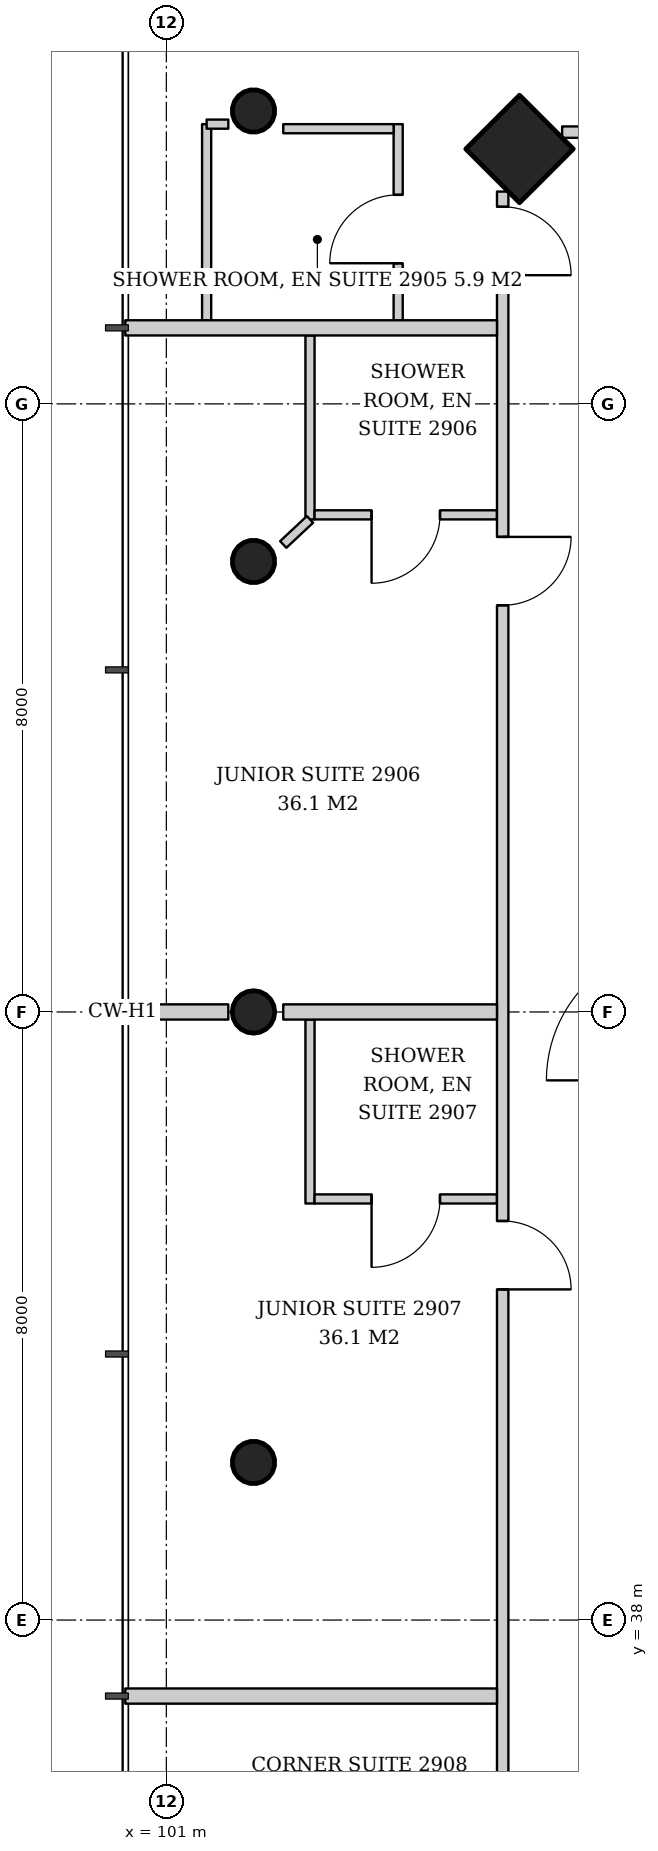
"""IFC4 building model, lengths in metres.
Left out: names, types, materials, properties, quantities, classifications, styles, units other than length and angle.
Written with IfcOpenShell. Run it as: python <this file> out.ifc"""

import sys

from ifc_helpers import new_model, si_unit, direction, frame, frame_2d, origin, origin_2d, place, context, subcontext, project, spatial, rectangle, hollow_circle, extrude, element, fill, save


model = new_model("IFC4")
c1 = context("Model", 3, precision=1e-05, world=origin(), true_north=direction((0.0, 1.0)))
c2 = subcontext(c1, "Body", "Model", "MODEL_VIEW")
j1 = project(units=[si_unit("LENGTHUNIT", "METRE"), si_unit("PLANEANGLEUNIT", "RADIAN")], contexts=[c1])
p1 = place(None, origin())
s1 = spatial("IfcSite", under=j1, at=p1, CompositionType="ELEMENT")
p2 = place(p1, origin())
s2 = spatial("IfcBuilding", under=s1, at=p2, CompositionType="ELEMENT")
p3 = place(p2, frame((0.0, 0.0, 116.0)))
s3 = spatial("IfcBuildingStorey", under=s2, at=p3, CompositionType="ELEMENT", Elevation=116.0)
p4 = place(p3, frame((105.595, 57.405, 0.0), z_axis=(0.043029647111, -0.043029647111, 0.998146732169), x_axis=(0.707106781187, 0.707106781187, 0.0)))
e1 = element("IfcColumn", 1, at=p4, inside=s3, PredefinedType="COLUMN", context=c2, shape_type="SweptSolid", body=[
    extrude(rectangle(XDim=1.0, YDim=1.0, at=origin_2d()), origin(), (0.0, 0.0, 1.0), 3.807),
])
p5 = place(p3, frame((102.095, 57.905, 0.0), z_axis=(0.043029647111, -0.043029647111, 0.998146732169), x_axis=(0.707106781187, 0.707106781187, 0.0)))
e2 = element("IfcColumn", 2, at=p5, inside=s3, PredefinedType="COLUMN", context=c2, shape_type="SweptSolid", body=[
    extrude(hollow_circle(Radius=0.28, WallThickness=0.02, at=origin_2d()), origin(), (0.0, 0.0, 1.0), 3.807),
])
p6 = place(p3, frame((102.095, 51.953, 0.0), z_axis=(0.043059525333, -0.021561848751, 0.998839808957), x_axis=(0.44774654769, 0.894160516368, 0.0)))
e3 = element("IfcColumn", 3, at=p6, inside=s3, PredefinedType="COLUMN", context=c2, shape_type="SweptSolid", body=[
    extrude(hollow_circle(Radius=0.28, WallThickness=0.02, at=origin_2d()), origin(), (0.0, 0.0, 1.0), 3.804),
])
p7 = place(p3, frame((102.095, 46.0, 0.0), z_axis=(0.043069538298, 0.0, 0.999072076915), x_axis=(0.0, 1.0, 0.0)))
e4 = element("IfcColumn", 4, at=p7, inside=s3, PredefinedType="COLUMN", context=c2, shape_type="SweptSolid", body=[
    extrude(hollow_circle(Radius=0.28, WallThickness=0.02, at=origin_2d()), origin(), (0.0, 0.0, 1.0), 3.803),
])
p8 = place(p3, frame((102.095, 40.047, 0.0), z_axis=(0.043059525333, 0.021561848751, 0.998839808957), x_axis=(-0.44774654769, 0.894160516368, 0.0)))
e5 = element("IfcColumn", 5, at=p8, inside=s3, PredefinedType="COLUMN", context=c2, shape_type="SweptSolid", body=[
    extrude(hollow_circle(Radius=0.28, WallThickness=0.02, at=origin_2d()), origin(), (0.0, 0.0, 1.0), 3.804),
])
p9 = place(p3, frame((127.793, 57.575, 0.0), z_axis=(0.0, 0.0, 1.0), x_axis=(-1.0, 0.0, 0.0)))
e6 = element("IfcWall", 6, at=p9, inside=s3, PredefinedType="PARTITIONING", context=c2, shape_type="SweptSolid", body=[
    extrude(rectangle(XDim=21.586, YDim=0.15, at=frame_2d((10.793, 0.0))), origin(), (0.0, 0.0, 1.0), 2.9),
])
p10 = place(p9, frame((0.2, 0.0, 0.0)))
e7 = element("IfcOpeningElement", 7, at=p10, cuts=e6, PredefinedType="OPENING", context=c2, shape_type="SweptSolid", body=[
    extrude(rectangle(XDim=0.9, YDim=2.1, at=frame_2d((0.45, 1.05))), frame((0.0, 0.085, 0.0), z_axis=(0.0, -1.0, 0.0), x_axis=(1.0, 0.0, 0.0)), (0.0, 0.0, 1.0), 0.17),
])
p11 = place(p9, frame((4.543, 0.0, 0.0)))
e8 = element("IfcOpeningElement", 8, at=p11, cuts=e6, PredefinedType="OPENING", context=c2, shape_type="SweptSolid", body=[
    extrude(rectangle(XDim=0.9, YDim=2.1, at=frame_2d((0.45, 1.05))), frame((0.0, 0.085, 0.0), z_axis=(0.0, -1.0, 0.0), x_axis=(1.0, 0.0, 0.0)), (0.0, 0.0, 1.0), 0.17),
])
p12 = place(p9, frame((13.493, 0.0, 0.0)))
e9 = element("IfcOpeningElement", 9, at=p12, cuts=e6, PredefinedType="OPENING", context=c2, shape_type="SweptSolid", body=[
    extrude(rectangle(XDim=1.0, YDim=2.1, at=frame_2d((0.5, 1.05))), frame((0.0, 0.085, 0.0), z_axis=(0.0, -1.0, 0.0), x_axis=(1.0, 0.0, 0.0)), (0.0, 0.0, 1.0), 0.17),
])
p13 = place(p3, frame((104.05, 55.1, 0.0), z_axis=(0.0, 0.0, 1.0), x_axis=(0.0, 1.0, 0.0)))
e10 = element("IfcWall", 10, at=p13, inside=s3, PredefinedType="PARTITIONING", context=c2, shape_type="SweptSolid", body=[
    extrude(rectangle(XDim=2.58, YDim=0.12, at=frame_2d((1.29, 0.0))), origin(), (0.0, 0.0, 1.0), 2.9),
])
p14 = place(p13, frame((0.75, 0.0, 0.0)))
e11 = element("IfcOpeningElement", 11, at=p14, cuts=e10, PredefinedType="OPENING", context=c2, shape_type="SweptSolid", body=[
    extrude(rectangle(XDim=0.9, YDim=2.1, at=frame_2d((0.45, 1.05))), frame((0.0, 0.07, 0.0), z_axis=(0.0, -1.0, 0.0), x_axis=(1.0, 0.0, 0.0)), (0.0, 0.0, 1.0), 0.14),
])
p15 = place(p3, frame((101.53, 55.1, 0.0), z_axis=(0.0, 0.0, 1.0), x_axis=(0.0, 1.0, 0.0)))
e12 = element("IfcWall", 12, at=p15, inside=s3, PredefinedType="PARTITIONING", context=c2, shape_type="SweptSolid", body=[
    extrude(rectangle(XDim=2.58, YDim=0.12, at=frame_2d((1.29, 0.0))), origin(), (0.0, 0.0, 1.0), 3.6),
])
p16 = place(p3, frame((103.99, 57.62, 0.0), z_axis=(0.0, 0.0, 1.0), x_axis=(-1.0, 0.0, 0.0)))
e13 = element("IfcWall", 13, at=p16, inside=s3, PredefinedType="PARTITIONING", context=c2, shape_type="SweptSolid", body=[
    extrude(rectangle(XDim=1.452, YDim=0.12, at=frame_2d((0.726, 0.0))), origin(), (0.0, 0.0, 1.0), 3.2),
])
p17 = place(p3, frame((102.89, 54.9, 0.0), z_axis=(0.0, 0.0, 1.0), x_axis=(0.0, -1.0, 0.0)))
e14 = element("IfcWall", 14, at=p17, inside=s3, PredefinedType="PARTITIONING", context=c2, shape_type="SweptSolid", body=[
    extrude(rectangle(XDim=2.42, YDim=0.12, at=frame_2d((1.21, 0.0))), origin(), (0.0, 0.0, 1.0), 3.6),
])
p18 = place(p3, frame((105.35, 52.54, 0.0), z_axis=(0.0, 0.0, 1.0), x_axis=(-1.0, 0.0, 0.0)))
e15 = element("IfcWall", 15, at=p18, inside=s3, PredefinedType="PARTITIONING", context=c2, shape_type="SweptSolid", body=[
    extrude(rectangle(XDim=2.4, YDim=0.12, at=frame_2d((1.2, 0.0))), origin(), (0.0, 0.0, 1.0), 3.6),
])
p19 = place(p18, frame((0.75, 0.0, 0.0)))
e16 = element("IfcOpeningElement", 16, at=p19, cuts=e15, PredefinedType="OPENING", context=c2, shape_type="SweptSolid", body=[
    extrude(rectangle(XDim=0.9, YDim=2.1, at=frame_2d((0.45, 1.05))), frame((0.0, 0.07, 0.0), z_axis=(0.0, -1.0, 0.0), x_axis=(1.0, 0.0, 0.0)), (0.0, 0.0, 1.0), 0.14),
])
p20 = place(p3, frame((102.89, 45.9, 0.0), z_axis=(0.0, 0.0, 1.0), x_axis=(0.0, -1.0, 0.0)))
e17 = element("IfcWall", 17, at=p20, inside=s3, PredefinedType="PARTITIONING", context=c2, shape_type="SweptSolid", body=[
    extrude(rectangle(XDim=2.42, YDim=0.12, at=frame_2d((1.21, 0.0))), origin(), (0.0, 0.0, 1.0), 3.6),
])
p21 = place(p3, frame((105.35, 43.54, 0.0), z_axis=(0.0, 0.0, 1.0), x_axis=(-1.0, 0.0, 0.0)))
e18 = element("IfcWall", 18, at=p21, inside=s3, PredefinedType="PARTITIONING", context=c2, shape_type="SweptSolid", body=[
    extrude(rectangle(XDim=2.4, YDim=0.12, at=frame_2d((1.2, 0.0))), origin(), (0.0, 0.0, 1.0), 3.6),
])
p22 = place(p21, frame((0.75, 0.0, 0.0)))
e19 = element("IfcOpeningElement", 19, at=p22, cuts=e18, PredefinedType="OPENING", context=c2, shape_type="SweptSolid", body=[
    extrude(rectangle(XDim=0.9, YDim=2.1, at=frame_2d((0.45, 1.05))), frame((0.0, 0.07, 0.0), z_axis=(0.0, -1.0, 0.0), x_axis=(1.0, 0.0, 0.0)), (0.0, 0.0, 1.0), 0.14),
])
p23 = place(p3, frame((105.425, 56.793, 0.0), z_axis=(0.0, 0.0, 1.0), x_axis=(0.0, -1.0, 0.0)))
e20 = element("IfcWall", 20, at=p23, inside=s3, PredefinedType="PARTITIONING", context=c2, shape_type="SweptSolid", body=[
    extrude(rectangle(XDim=21.586, YDim=0.15, at=frame_2d((10.793, 0.0))), origin(), (0.0, 0.0, 1.0), 2.9),
])
p24 = place(p23, frame((0.2, 0.0, 0.0)))
e21 = element("IfcOpeningElement", 21, at=p24, cuts=e20, PredefinedType="OPENING", context=c2, shape_type="SweptSolid", body=[
    extrude(rectangle(XDim=0.9, YDim=2.1, at=frame_2d((0.45, 1.05))), frame((0.0, 0.085, 0.0), z_axis=(0.0, -1.0, 0.0), x_axis=(1.0, 0.0, 0.0)), (0.0, 0.0, 1.0), 0.17),
])
p25 = place(p23, frame((4.543, 0.0, 0.0)))
e22 = element("IfcOpeningElement", 22, at=p25, cuts=e20, PredefinedType="OPENING", context=c2, shape_type="SweptSolid", body=[
    extrude(rectangle(XDim=0.9, YDim=2.1, at=frame_2d((0.45, 1.05))), frame((0.0, 0.085, 0.0), z_axis=(0.0, -1.0, 0.0), x_axis=(1.0, 0.0, 0.0)), (0.0, 0.0, 1.0), 0.17),
])
p26 = place(p23, frame((13.543, 0.0, 0.0)))
e23 = element("IfcOpeningElement", 23, at=p26, cuts=e20, PredefinedType="OPENING", context=c2, shape_type="SweptSolid", body=[
    extrude(rectangle(XDim=0.9, YDim=2.1, at=frame_2d((0.45, 1.05))), frame((0.0, 0.085, 0.0), z_axis=(0.0, -1.0, 0.0), x_axis=(1.0, 0.0, 0.0)), (0.0, 0.0, 1.0), 0.17),
])
p27 = place(p3, frame((105.35, 55.0, 0.0), z_axis=(0.0, 0.0, 1.0), x_axis=(-1.0, 0.0, 0.0)))
e24 = element("IfcWall", 24, at=p27, inside=s3, PredefinedType="PARTITIONING", context=c2, shape_type="SweptSolid", body=[
    extrude(rectangle(XDim=4.89, YDim=0.2, at=frame_2d((2.445, 0.0))), origin(), (0.0, 0.0, 1.0), 2.9),
])
p28 = place(p3, frame((105.35, 46.0, 0.0), z_axis=(0.0, 0.0, 1.0), x_axis=(-1.0, 0.0, 0.0)))
e25 = element("IfcWall", 25, at=p28, inside=s3, PredefinedType="PARTITIONING", context=c2, shape_type="SweptSolid", body=[
    extrude(rectangle(XDim=2.812, YDim=0.2, at=frame_2d((1.406, 0.0))), origin(), (0.0, 0.0, 1.0), 3.6),
])
p29 = place(p3, frame((101.815, 46.0, 0.0), z_axis=(0.0, 0.0, 1.0), x_axis=(-1.0, 0.0, 0.0)))
e26 = element("IfcWall", 26, at=p29, inside=s3, PredefinedType="PARTITIONING", context=c2, shape_type="SweptSolid", body=[
    extrude(rectangle(XDim=1.355, YDim=0.2, at=frame_2d((0.678, 0.0))), origin(), (0.0, 0.0, 1.0), 3.6),
])
p30 = place(p3, frame((105.35, 37.0, 0.0), z_axis=(0.0, 0.0, 1.0), x_axis=(-1.0, 0.0, 0.0)))
e27 = element("IfcWall", 27, at=p30, inside=s3, PredefinedType="PARTITIONING", context=c2, shape_type="SweptSolid", body=[
    extrude(rectangle(XDim=4.89, YDim=0.2, at=frame_2d((2.445, 0.0))), origin(), (0.0, 0.0, 1.0), 3.2),
])
p31 = place(p3, frame((101.53, 57.68, 0.0), z_axis=(0.0, 0.0, 1.0), x_axis=(1.0, 0.0, 0.0)))
e28 = element("IfcWall", 28, at=p31, inside=s3, PredefinedType="PARTITIONING", context=c2, shape_type="SweptSolid", body=[
    extrude(rectangle(XDim=0.285, YDim=0.12, at=frame_2d((0.143, 0.0))), origin(), (0.0, 0.0, 1.0), 3.6),
])
p32 = place(p3, frame((102.89, 52.48, 0.0), z_axis=(0.0, 0.0, 1.0), x_axis=(-0.729521416195, -0.683957968966, 0.0)))
e29 = element("IfcWall", 29, at=p32, inside=s3, PredefinedType="PARTITIONING", context=c2, shape_type="SweptSolid", body=[
    extrude(rectangle(XDim=0.482, YDim=0.12, at=frame_2d((0.241, 0.0))), origin(), (0.0, 0.0, 1.0), 3.6),
])
p33 = place(p14, origin())
e30 = element("IfcDoor", 30, at=p33, inside=s3, OperationType="SINGLE_SWING_LEFT", PredefinedType="DOOR", context=c2, shape_type="SweptSolid", body=[
    extrude(rectangle(XDim=0.9, YDim=2.1, at=frame_2d((0.45, 1.05))), frame((0.0, 0.025, 0.0), z_axis=(0.0, -1.0, 0.0), x_axis=(1.0, 0.0, 0.0)), (0.0, 0.0, 1.0), 0.05),
])
fill(e11, e30)
p34 = place(p19, origin())
e31 = element("IfcDoor", 31, at=p34, inside=s3, OperationType="SINGLE_SWING_RIGHT", PredefinedType="DOOR", context=c2, shape_type="SweptSolid", body=[
    extrude(rectangle(XDim=0.9, YDim=2.1, at=frame_2d((0.45, 1.05))), frame((0.0, 0.025, 0.0), z_axis=(0.0, -1.0, 0.0), x_axis=(1.0, 0.0, 0.0)), (0.0, 0.0, 1.0), 0.05),
])
fill(e16, e31)
p35 = place(p22, origin())
e32 = element("IfcDoor", 32, at=p35, inside=s3, OperationType="SINGLE_SWING_RIGHT", PredefinedType="DOOR", context=c2, shape_type="SweptSolid", body=[
    extrude(rectangle(XDim=0.9, YDim=2.1, at=frame_2d((0.45, 1.05))), frame((0.0, 0.025, 0.0), z_axis=(0.0, -1.0, 0.0), x_axis=(1.0, 0.0, 0.0)), (0.0, 0.0, 1.0), 0.05),
])
fill(e19, e32)
p36 = place(p24, origin())
e33 = element("IfcDoor", 33, at=p36, inside=s3, OperationType="SINGLE_SWING_RIGHT", PredefinedType="DOOR", context=c2, shape_type="SweptSolid", body=[
    extrude(rectangle(XDim=0.9, YDim=2.1, at=frame_2d((0.45, 1.05))), frame((0.0, 0.025, 0.0), z_axis=(0.0, -1.0, 0.0), x_axis=(1.0, 0.0, 0.0)), (0.0, 0.0, 1.0), 0.05),
])
fill(e21, e33)
p37 = place(p25, origin())
e34 = element("IfcDoor", 34, at=p37, inside=s3, OperationType="SINGLE_SWING_LEFT", PredefinedType="DOOR", context=c2, shape_type="SweptSolid", body=[
    extrude(rectangle(XDim=0.9, YDim=2.1, at=frame_2d((0.45, 1.05))), frame((0.0, 0.025, 0.0), z_axis=(0.0, -1.0, 0.0), x_axis=(1.0, 0.0, 0.0)), (0.0, 0.0, 1.0), 0.05),
])
fill(e22, e34)
p38 = place(p26, origin())
e35 = element("IfcDoor", 35, at=p38, inside=s3, OperationType="SINGLE_SWING_RIGHT", PredefinedType="DOOR", context=c2, shape_type="SweptSolid", body=[
    extrude(rectangle(XDim=0.9, YDim=2.1, at=frame_2d((0.45, 1.05))), frame((0.0, 0.025, 0.0), z_axis=(0.0, -1.0, 0.0), x_axis=(1.0, 0.0, 0.0)), (0.0, 0.0, 1.0), 0.05),
])
fill(e23, e35)
save(model, sys.argv[1])
